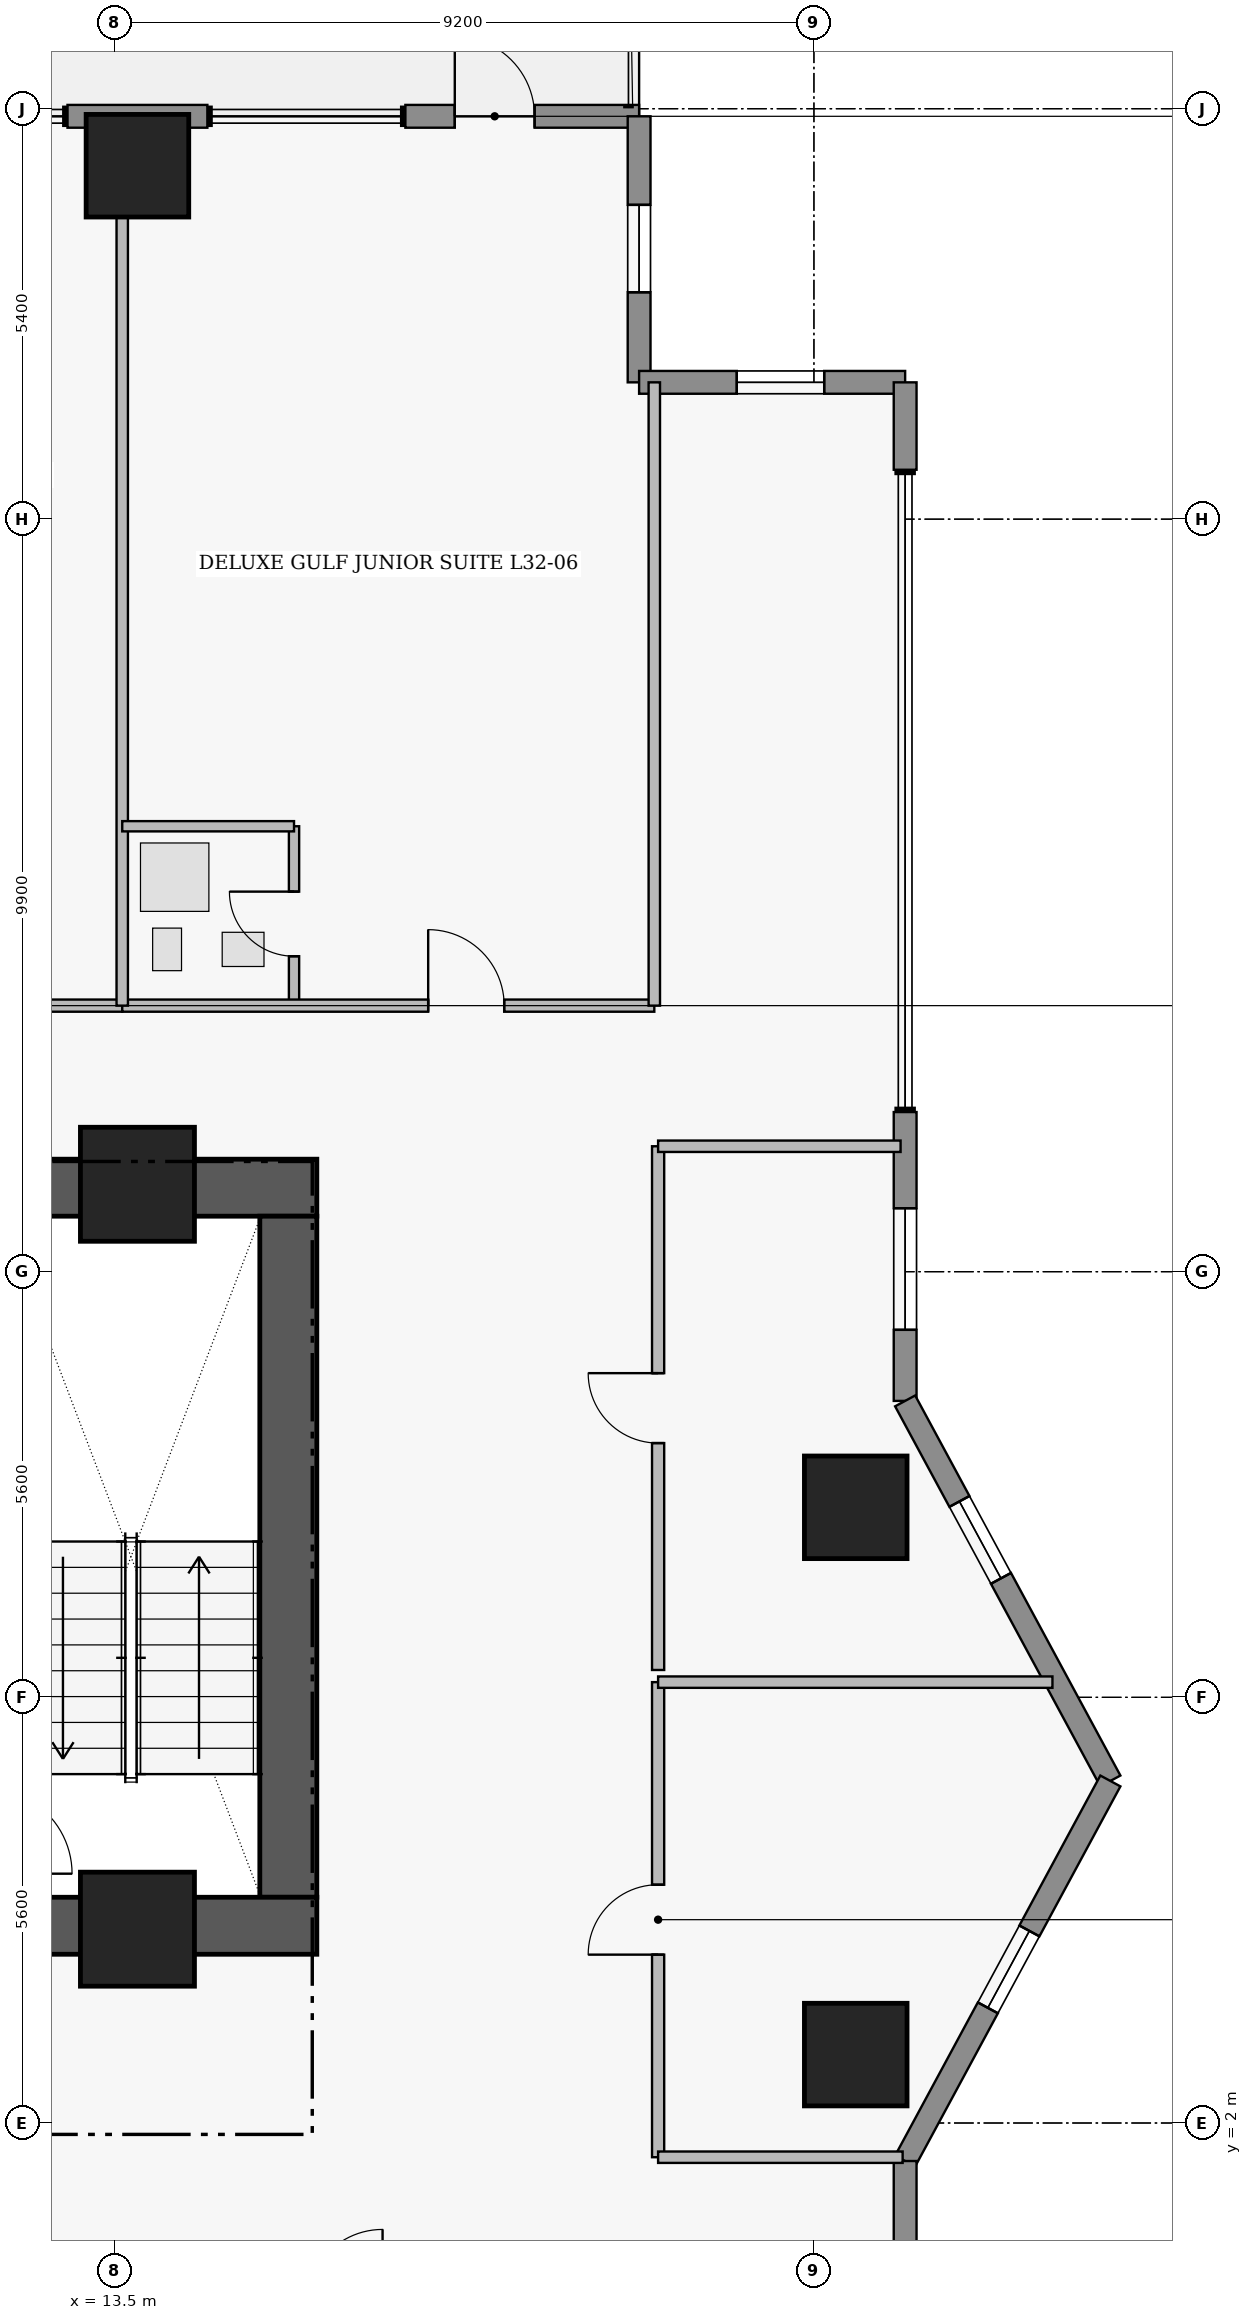
"""IFC4 building model, lengths in metres.
Left out: names, types, materials, properties, quantities, classifications, styles, units other than length and angle.
Written with IfcOpenShell. Run it as: python <this file> out.ifc"""

import sys

from ifc_helpers import new_model, si_unit, direction, frame, frame_2d, origin, origin_2d, place, context, subcontext, project, spatial, rectangle, extrude, element, fill, save


model = new_model("IFC4")
c1 = context("Model", 3, precision=1e-05, world=origin(), true_north=direction((0.0, 1.0)))
c2 = subcontext(c1, "Body", "Model", "MODEL_VIEW")
j1 = project(units=[si_unit("LENGTHUNIT", "METRE"), si_unit("PLANEANGLEUNIT", "RADIAN")], contexts=[c1])
p1 = place(None, origin())
s1 = spatial("IfcSite", under=j1, at=p1, CompositionType="ELEMENT")
p2 = place(p1, origin())
s2 = spatial("IfcBuilding", under=s1, at=p2, CompositionType="ELEMENT")
p3 = place(p2, frame((0.0, 0.0, 128.5)))
s3 = spatial("IfcBuildingStorey", under=s2, at=p3, CompositionType="ELEMENT", Elevation=128.5)
p4 = place(p3, frame((11.6, 14.305, 0.0), z_axis=(0.0, 0.0, 1.0), x_axis=(1.0, 0.0, 0.0)))
e1 = element("IfcWall", 1, at=p4, inside=s3, PredefinedType="SHEAR", context=c2, shape_type="SweptSolid", body=[
    extrude(rectangle(XDim=4.56, YDim=0.75, at=frame_2d((2.28, 0.0))), origin(), (0.0, 0.0, 1.0), 3.46),
])
p5 = place(p3, frame((15.785, 4.97, 0.0), z_axis=(0.0, 0.0, 1.0), x_axis=(0.0, 1.0, 0.0)))
e2 = element("IfcWall", 2, at=p5, inside=s3, PredefinedType="SHEAR", context=c2, shape_type="SweptSolid", body=[
    extrude(rectangle(XDim=8.96, YDim=0.75, at=frame_2d((4.48, 0.0))), origin(), (0.0, 0.0, 1.0), 3.46),
])
p6 = place(p3, frame((11.6, 4.595, 0.0), z_axis=(0.0, 0.0, 1.0), x_axis=(1.0, 0.0, 0.0)))
e3 = element("IfcWall", 3, at=p6, inside=s3, PredefinedType="SHEAR", context=c2, shape_type="SweptSolid", body=[
    extrude(rectangle(XDim=4.56, YDim=0.75, at=frame_2d((2.28, 0.0))), origin(), (0.0, 0.0, 1.0), 3.46),
])
for number, where, z_axis, x_axis in (
    (4, (13.8, 14.35, 0.0), (0.0, 0.0, 1.0), (1.0, 0.0, 0.0)),
    (5, (13.8, 4.55, 0.0), (0.0, 0.0, 1.0), (1.0, 0.0, 0.0)),
):
    element("IfcColumn", number, at=place(p3, frame(where, z_axis=z_axis, x_axis=x_axis)), inside=s3, PredefinedType="COLUMN", context=c2, shape_type="SweptSolid", body=[
        extrude(rectangle(XDim=1.5, YDim=1.5, at=origin_2d()), origin(), (0.0, 0.0, 1.0), 3.65),
    ])
for number, where, z_axis, x_axis in (
    (6, (13.8, 27.75, 0.0), (0.0, 0.0, 1.0), (1.0, 0.0, 0.0)),
    (7, (23.25, 2.9, 0.0), (0.0, 0.0, 1.0), (1.0, 0.0, 0.0)),
    (8, (23.25, 10.1, 0.0), (0.0, 0.0, 1.0), (1.0, 0.0, 0.0)),
):
    element("IfcColumn", number, at=place(p3, frame(where, z_axis=z_axis, x_axis=x_axis)), inside=s3, PredefinedType="COLUMN", context=c2, shape_type="SweptSolid", body=[
        extrude(rectangle(XDim=1.35, YDim=1.35, at=origin_2d()), origin(), (0.0, 0.0, 1.0), 3.65),
    ])
p7 = place(p3, frame((12.88, 28.4, 0.0), z_axis=(0.0, 0.0, 1.0), x_axis=(1.0, 0.0, 0.0)))
e9 = element("IfcWall", 9, at=p7, inside=s3, PredefinedType="STANDARD", context=c2, shape_type="SweptSolid", body=[
    extrude(rectangle(XDim=1.84, YDim=0.3, at=frame_2d((0.92, 0.0))), origin(), (0.0, 0.0, 1.0), 3.43),
])
p8 = place(p3, frame((17.325, 28.4, 0.0), z_axis=(0.0, 0.0, 1.0), x_axis=(1.0, 0.0, 0.0)))
e10 = element("IfcWall", 10, at=p8, inside=s3, PredefinedType="STANDARD", context=c2, shape_type="SweptSolid", body=[
    extrude(rectangle(XDim=3.075, YDim=0.3, at=frame_2d((1.538, 0.0))), origin(), (0.0, 0.0, 1.0), 3.43),
])
p9 = place(p8, frame((0.65, 0.0, 0.0)))
e11 = element("IfcOpeningElement", 11, at=p9, cuts=e10, PredefinedType="OPENING", context=c2, shape_type="SweptSolid", body=[
    extrude(rectangle(XDim=1.05, YDim=2.2, at=frame_2d((0.525, 1.1))), frame((0.0, 0.16, 0.0), z_axis=(0.0, -1.0, 0.0), x_axis=(1.0, 0.0, 0.0)), (0.0, 0.0, 1.0), 0.32),
])
p10 = place(p3, frame((20.4, 28.4, 0.0), z_axis=(0.0, 0.0, 1.0), x_axis=(0.0, -1.0, 0.0)))
e12 = element("IfcWall", 12, at=p10, inside=s3, PredefinedType="STANDARD", context=c2, shape_type="SweptSolid", body=[
    extrude(rectangle(XDim=3.5, YDim=0.3, at=frame_2d((1.75, 0.0))), origin(), (0.0, 0.0, 1.0), 3.43),
])
p11 = place(p10, frame((1.165, 0.0, 1.25)))
e13 = element("IfcOpeningElement", 13, at=p11, cuts=e12, PredefinedType="OPENING", context=c2, shape_type="SweptSolid", body=[
    extrude(rectangle(XDim=1.15, YDim=1.55, at=frame_2d((0.575, 0.775))), frame((0.0, 0.16, 0.0), z_axis=(0.0, -1.0, 0.0), x_axis=(1.0, 0.0, 0.0)), (0.0, 0.0, 1.0), 0.32),
])
p12 = place(p3, frame((20.4, 24.9, 0.0), z_axis=(0.0, 0.0, 1.0), x_axis=(1.0, 0.0, 0.0)))
e14 = element("IfcWall", 14, at=p12, inside=s3, PredefinedType="STANDARD", context=c2, shape_type="SweptSolid", body=[
    extrude(rectangle(XDim=3.5, YDim=0.3, at=frame_2d((1.75, 0.0))), origin(), (0.0, 0.0, 1.0), 3.43),
])
p13 = place(p12, frame((1.285, 0.0, 1.25)))
e15 = element("IfcOpeningElement", 15, at=p13, cuts=e14, PredefinedType="OPENING", context=c2, shape_type="SweptSolid", body=[
    extrude(rectangle(XDim=1.15, YDim=1.55, at=frame_2d((0.575, 0.775))), frame((0.0, 0.16, 0.0), z_axis=(0.0, -1.0, 0.0), x_axis=(1.0, 0.0, 0.0)), (0.0, 0.0, 1.0), 0.32),
])
p14 = place(p3, frame((23.9, 24.9, 0.0), z_axis=(0.0, 0.0, 1.0), x_axis=(0.0, -1.0, 0.0)))
e16 = element("IfcWall", 16, at=p14, inside=s3, PredefinedType="STANDARD", context=c2, shape_type="SweptSolid", body=[
    extrude(rectangle(XDim=1.15, YDim=0.3, at=frame_2d((0.575, 0.0))), origin(), (0.0, 0.0, 1.0), 3.43),
])
p15 = place(p3, frame((23.9, 15.3, 0.0), z_axis=(0.0, 0.0, 1.0), x_axis=(0.0, -1.0, 0.0)))
e17 = element("IfcWall", 17, at=p15, inside=s3, PredefinedType="STANDARD", context=c2, shape_type="SweptSolid", body=[
    extrude(rectangle(XDim=3.8, YDim=0.3, at=frame_2d((1.9, 0.0))), origin(), (0.0, 0.0, 1.0), 3.43),
])
p16 = place(p15, frame((1.265, 0.0, 0.85)))
e18 = element("IfcOpeningElement", 18, at=p16, cuts=e17, PredefinedType="OPENING", context=c2, shape_type="SweptSolid", body=[
    extrude(rectangle(XDim=1.6, YDim=1.8, at=frame_2d((0.8, 0.9))), frame((0.0, 0.16, 0.0), z_axis=(0.0, -1.0, 0.0), x_axis=(1.0, 0.0, 0.0)), (0.0, 0.0, 1.0), 0.32),
])
p17 = place(p3, frame((23.9, 11.5, 0.0), z_axis=(0.0, 0.0, 1.0), x_axis=(0.475175525499, -0.879891027325, 0.0)))
e19 = element("IfcWall", 19, at=p17, inside=s3, PredefinedType="STANDARD", context=c2, shape_type="SweptSolid", body=[
    extrude(rectangle(XDim=5.683, YDim=0.3, at=frame_2d((2.841, 0.0))), origin(), (0.0, 0.0, 1.0), 3.43),
])
p18 = place(p17, frame((1.503, 0.0, 1.25)))
e20 = element("IfcOpeningElement", 20, at=p18, cuts=e19, PredefinedType="OPENING", context=c2, shape_type="SweptSolid", body=[
    extrude(rectangle(XDim=1.15, YDim=1.55, at=frame_2d((0.575, 0.775))), frame((0.0, 0.16, 0.0), z_axis=(0.0, -1.0, 0.0), x_axis=(1.0, 0.0, 0.0)), (0.0, 0.0, 1.0), 0.32),
])
p19 = place(p3, frame((26.6, 6.5, 0.0), z_axis=(0.0, 0.0, 1.0), x_axis=(-0.475175525499, -0.879891027325, 0.0)))
e21 = element("IfcWall", 21, at=p19, inside=s3, PredefinedType="STANDARD", context=c2, shape_type="SweptSolid", body=[
    extrude(rectangle(XDim=5.683, YDim=0.3, at=frame_2d((2.841, 0.0))), origin(), (0.0, 0.0, 1.0), 3.43),
])
p20 = place(p19, frame((2.242, 0.0, 1.25)))
e22 = element("IfcOpeningElement", 22, at=p20, cuts=e21, PredefinedType="OPENING", context=c2, shape_type="SweptSolid", body=[
    extrude(rectangle(XDim=1.15, YDim=1.55, at=frame_2d((0.575, 0.775))), frame((0.0, 0.16, 0.0), z_axis=(0.0, -1.0, 0.0), x_axis=(1.0, 0.0, 0.0)), (0.0, 0.0, 1.0), 0.32),
])
p21 = place(p3, frame((23.9, 1.5, 0.0), z_axis=(0.0, 0.0, 1.0), x_axis=(0.0, -1.0, 0.0)))
e23 = element("IfcWall", 23, at=p21, inside=s3, PredefinedType="STANDARD", context=c2, shape_type="SweptSolid", body=[
    extrude(rectangle(XDim=1.15, YDim=0.3, at=frame_2d((0.575, 0.0))), origin(), (0.0, 0.0, 1.0), 3.43),
])
p22 = place(p3, frame((6.8, 16.7, 0.0), z_axis=(0.0, 0.0, 1.0), x_axis=(1.0, 0.0, 0.0)))
e24 = element("IfcWall", 24, at=p22, inside=s3, PredefinedType="PARTITIONING", context=c2, shape_type="SweptSolid", body=[
    extrude(rectangle(XDim=6.8, YDim=0.16, at=frame_2d((3.4, 0.0))), origin(), (0.0, 0.0, 1.0), 2.973),
])
p23 = place(p22, frame((4.075, 0.0, 0.0)))
e25 = element("IfcOpeningElement", 25, at=p23, cuts=e24, PredefinedType="OPENING", context=c2, shape_type="SweptSolid", body=[
    extrude(rectangle(XDim=0.95, YDim=2.15, at=frame_2d((0.475, 1.075))), frame((0.0, 0.09, 0.0), z_axis=(0.0, -1.0, 0.0), x_axis=(1.0, 0.0, 0.0)), (0.0, 0.0, 1.0), 0.18),
])
p24 = place(p3, frame((15.86, 16.7, 0.0), z_axis=(0.0, 0.0, 1.0), x_axis=(0.0, 1.0, 0.0)))
e26 = element("IfcWall", 26, at=p24, inside=s3, PredefinedType="PLUMBINGWALL", context=c2, shape_type="SweptSolid", body=[
    extrude(rectangle(XDim=2.36, YDim=0.135, at=frame_2d((1.18, 0.0))), origin(), (0.0, 0.0, 1.0), 3.43),
])
p25 = place(p24, frame((0.65, 0.0, 0.0)))
e27 = element("IfcOpeningElement", 27, at=p25, cuts=e26, PredefinedType="OPENING", context=c2, shape_type="SweptSolid", body=[
    extrude(rectangle(XDim=0.85, YDim=2.1, at=frame_2d((0.425, 1.05))), frame((0.0, 0.077, 0.0), z_axis=(0.0, -1.0, 0.0), x_axis=(1.0, 0.0, 0.0)), (0.0, 0.0, 1.0), 0.155),
])
p26 = place(p3, frame((13.6, 16.7, 0.0), z_axis=(0.0, 0.0, 1.0), x_axis=(1.0, 0.0, 0.0)))
e28 = element("IfcWall", 28, at=p26, inside=s3, PredefinedType="PARTITIONING", context=c2, shape_type="SweptSolid", body=[
    extrude(rectangle(XDim=7.0, YDim=0.16, at=frame_2d((3.5, 0.0))), origin(), (0.0, 0.0, 1.0), 3.43),
])
p27 = place(p26, frame((4.025, 0.0, 0.0)))
e29 = element("IfcOpeningElement", 29, at=p27, cuts=e28, PredefinedType="OPENING", context=c2, shape_type="SweptSolid", body=[
    extrude(rectangle(XDim=1.0, YDim=2.15, at=frame_2d((0.5, 1.075))), frame((0.0, 0.09, 0.0), z_axis=(0.0, -1.0, 0.0), x_axis=(1.0, 0.0, 0.0)), (0.0, 0.0, 1.0), 0.18),
])
p28 = place(p3, frame((20.65, 1.55, 0.0), z_axis=(0.0, 0.0, 1.0), x_axis=(0.0, 1.0, 0.0)))
e30 = element("IfcWall", 30, at=p28, inside=s3, PredefinedType="PARTITIONING", context=c2, shape_type="SweptSolid", body=[
    extrude(rectangle(XDim=6.25, YDim=0.16, at=frame_2d((3.125, 0.0))), origin(), (0.0, 0.0, 1.0), 3.43),
])
p29 = place(p28, frame((2.665, 0.0, 0.0)))
e31 = element("IfcOpeningElement", 31, at=p29, cuts=e30, PredefinedType="OPENING", context=c2, shape_type="SweptSolid", body=[
    extrude(rectangle(XDim=0.92, YDim=2.12, at=frame_2d((0.46, 1.06))), frame((0.0, 0.09, 0.0), z_axis=(0.0, -1.0, 0.0), x_axis=(1.0, 0.0, 0.0)), (0.0, 0.0, 1.0), 0.18),
])
p30 = place(p3, frame((20.65, 7.96, 0.0), z_axis=(0.0, 0.0, 1.0), x_axis=(0.0, 1.0, 0.0)))
e32 = element("IfcWall", 32, at=p30, inside=s3, PredefinedType="PARTITIONING", context=c2, shape_type="SweptSolid", body=[
    extrude(rectangle(XDim=6.89, YDim=0.16, at=frame_2d((3.445, 0.0))), origin(), (0.0, 0.0, 1.0), 3.43),
])
p31 = place(p30, frame((2.985, 0.0, 0.0)))
e33 = element("IfcOpeningElement", 33, at=p31, cuts=e32, PredefinedType="OPENING", context=c2, shape_type="SweptSolid", body=[
    extrude(rectangle(XDim=0.92, YDim=2.12, at=frame_2d((0.46, 1.06))), frame((0.0, 0.09, 0.0), z_axis=(0.0, -1.0, 0.0), x_axis=(1.0, 0.0, 0.0)), (0.0, 0.0, 1.0), 0.18),
])
p32 = place(p3, frame((13.6, 16.7, 0.0), z_axis=(0.0, 0.0, 1.0), x_axis=(0.0, 1.0, 0.0)))
e34 = element("IfcWall", 34, at=p32, inside=s3, PredefinedType="PARTITIONING", context=c2, shape_type="SweptSolid", body=[
    extrude(rectangle(XDim=11.62, YDim=0.15, at=frame_2d((5.81, 0.0))), origin(), (0.0, 0.0, 1.0), 2.503),
])
p33 = place(p3, frame((13.6, 19.06, 0.0), z_axis=(0.0, 0.0, 1.0), x_axis=(1.0, 0.0, 0.0)))
e35 = element("IfcWall", 35, at=p33, inside=s3, PredefinedType="PLUMBINGWALL", context=c2, shape_type="SweptSolid", body=[
    extrude(rectangle(XDim=2.26, YDim=0.135, at=frame_2d((1.13, 0.0))), origin(), (0.0, 0.0, 1.0), 3.43),
])
p34 = place(p3, frame((20.6, 16.7, 0.0), z_axis=(0.0, 0.0, 1.0), x_axis=(0.0, 1.0, 0.0)))
e36 = element("IfcWall", 36, at=p34, inside=s3, PredefinedType="PARTITIONING", context=c2, shape_type="SweptSolid", body=[
    extrude(rectangle(XDim=8.2, YDim=0.15, at=frame_2d((4.1, 0.0))), origin(), (0.0, 0.0, 1.0), 3.43),
])
p35 = place(p3, frame((20.65, 1.55, 0.0), z_axis=(0.0, 0.0, 1.0), x_axis=(1.0, 0.0, 0.0)))
e37 = element("IfcWall", 37, at=p35, inside=s3, PredefinedType="PARTITIONING", context=c2, shape_type="SweptSolid", body=[
    extrude(rectangle(XDim=3.217, YDim=0.15, at=frame_2d((1.608, 0.0))), origin(), (0.0, 0.0, 1.0), 3.43),
])
p36 = place(p3, frame((20.65, 7.8, 0.0), z_axis=(0.0, 0.0, 1.0), x_axis=(1.0, 0.0, 0.0)))
e38 = element("IfcWall", 38, at=p36, inside=s3, PredefinedType="PARTITIONING", context=c2, shape_type="SweptSolid", body=[
    extrude(rectangle(XDim=5.188, YDim=0.15, at=frame_2d((2.594, 0.0))), origin(), (0.0, 0.0, 1.0), 3.43),
])
p37 = place(p3, frame((20.65, 14.85, 0.0), z_axis=(0.0, 0.0, 1.0), x_axis=(1.0, 0.0, 0.0)))
e39 = element("IfcWall", 39, at=p37, inside=s3, PredefinedType="PARTITIONING", context=c2, shape_type="SweptSolid", body=[
    extrude(rectangle(XDim=3.19, YDim=0.15, at=frame_2d((1.595, 0.0))), origin(), (0.0, 0.0, 1.0), 3.43),
])
p38 = place(p9, origin())
e40 = element("IfcDoor", 40, at=p38, inside=s3, OperationType="SINGLE_SWING_LEFT", PredefinedType="DOOR", context=c2, shape_type="SweptSolid", body=[
    extrude(rectangle(XDim=1.05, YDim=2.2, at=frame_2d((0.525, 1.1))), frame((0.0, 0.025, 0.0), z_axis=(0.0, -1.0, 0.0), x_axis=(1.0, 0.0, 0.0)), (0.0, 0.0, 1.0), 0.05),
])
fill(e11, e40)
p39 = place(p11, origin())
e41 = element("IfcWindow", 41, at=p39, inside=s3, PartitioningType="SINGLE_PANEL", PredefinedType="WINDOW", context=c2, shape_type="SweptSolid", body=[
    extrude(rectangle(XDim=1.15, YDim=1.55, at=frame_2d((0.575, 0.775))), frame((0.0, 0.03, 0.0), z_axis=(0.0, -1.0, 0.0), x_axis=(1.0, 0.0, 0.0)), (0.0, 0.0, 1.0), 0.06),
])
fill(e13, e41)
p40 = place(p13, origin())
e42 = element("IfcWindow", 42, at=p40, inside=s3, PartitioningType="SINGLE_PANEL", PredefinedType="WINDOW", context=c2, shape_type="SweptSolid", body=[
    extrude(rectangle(XDim=1.15, YDim=1.55, at=frame_2d((0.575, 0.775))), frame((0.0, 0.03, 0.0), z_axis=(0.0, -1.0, 0.0), x_axis=(1.0, 0.0, 0.0)), (0.0, 0.0, 1.0), 0.06),
])
fill(e15, e42)
p41 = place(p16, origin())
e43 = element("IfcWindow", 43, at=p41, inside=s3, PartitioningType="SINGLE_PANEL", PredefinedType="WINDOW", context=c2, shape_type="SweptSolid", body=[
    extrude(rectangle(XDim=1.6, YDim=1.8, at=frame_2d((0.8, 0.9))), frame((0.0, 0.03, 0.0), z_axis=(0.0, -1.0, 0.0), x_axis=(1.0, 0.0, 0.0)), (0.0, 0.0, 1.0), 0.06),
])
fill(e18, e43)
p42 = place(p18, origin())
e44 = element("IfcWindow", 44, at=p42, inside=s3, PartitioningType="SINGLE_PANEL", PredefinedType="WINDOW", context=c2, shape_type="SweptSolid", body=[
    extrude(rectangle(XDim=1.15, YDim=1.55, at=frame_2d((0.575, 0.775))), frame((0.0, 0.03, 0.0), z_axis=(0.0, -1.0, 0.0), x_axis=(1.0, 0.0, 0.0)), (0.0, 0.0, 1.0), 0.06),
])
fill(e20, e44)
p43 = place(p20, origin())
e45 = element("IfcWindow", 45, at=p43, inside=s3, PartitioningType="SINGLE_PANEL", PredefinedType="WINDOW", context=c2, shape_type="SweptSolid", body=[
    extrude(rectangle(XDim=1.15, YDim=1.55, at=frame_2d((0.575, 0.775))), frame((0.0, 0.03, 0.0), z_axis=(0.0, -1.0, 0.0), x_axis=(1.0, 0.0, 0.0)), (0.0, 0.0, 1.0), 0.06),
])
fill(e22, e45)
p44 = place(p25, origin())
e46 = element("IfcDoor", 46, at=p44, inside=s3, OperationType="SINGLE_SWING_RIGHT", PredefinedType="DOOR", context=c2, shape_type="SweptSolid", body=[
    extrude(rectangle(XDim=0.85, YDim=2.1, at=frame_2d((0.425, 1.05))), frame((0.0, 0.025, 0.0), z_axis=(0.0, -1.0, 0.0), x_axis=(1.0, 0.0, 0.0)), (0.0, 0.0, 1.0), 0.05),
])
fill(e27, e46)
p45 = place(p27, origin())
e47 = element("IfcDoor", 47, at=p45, inside=s3, OperationType="SINGLE_SWING_LEFT", PredefinedType="DOOR", context=c2, shape_type="SweptSolid", body=[
    extrude(rectangle(XDim=1.0, YDim=2.15, at=frame_2d((0.5, 1.075))), frame((0.0, 0.025, 0.0), z_axis=(0.0, -1.0, 0.0), x_axis=(1.0, 0.0, 0.0)), (0.0, 0.0, 1.0), 0.05),
])
fill(e29, e47)
p46 = place(p29, origin())
e48 = element("IfcDoor", 48, at=p46, inside=s3, OperationType="SINGLE_SWING_LEFT", PredefinedType="DOOR", context=c2, shape_type="SweptSolid", body=[
    extrude(rectangle(XDim=0.92, YDim=2.12, at=frame_2d((0.46, 1.06))), frame((0.0, 0.025, 0.0), z_axis=(0.0, -1.0, 0.0), x_axis=(1.0, 0.0, 0.0)), (0.0, 0.0, 1.0), 0.05),
])
fill(e31, e48)
p47 = place(p31, origin())
e49 = element("IfcDoor", 49, at=p47, inside=s3, OperationType="SINGLE_SWING_RIGHT", PredefinedType="DOOR", context=c2, shape_type="SweptSolid", body=[
    extrude(rectangle(XDim=0.92, YDim=2.12, at=frame_2d((0.46, 1.06))), frame((0.0, 0.025, 0.0), z_axis=(0.0, -1.0, 0.0), x_axis=(1.0, 0.0, 0.0)), (0.0, 0.0, 1.0), 0.05),
])
fill(e33, e49)
save(model, sys.argv[1])
